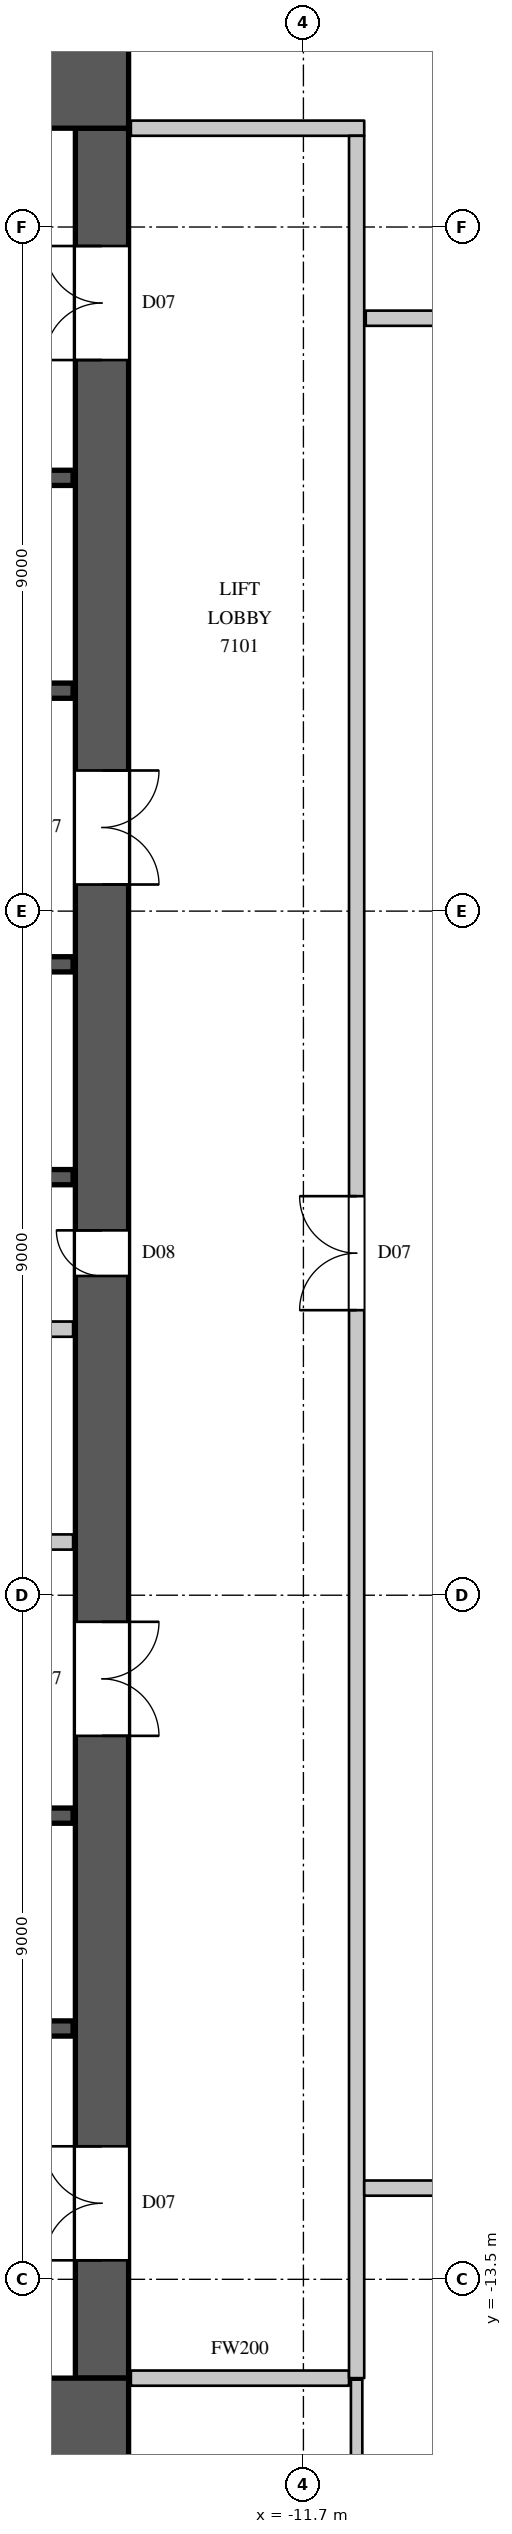
"""IFC4 building model, lengths in metres.
Left out: names, types, materials, properties, quantities, classifications, styles, units other than length and angle.
Written with IfcOpenShell. Run it as: python <this file> out.ifc"""

import sys

from ifc_helpers import new_model, si_unit, direction, frame, frame_2d, origin, place, context, subcontext, project, spatial, rectangle, extrude, element, fill, save


model = new_model("IFC4")
c1 = context("Model", 3, precision=1e-05, world=origin(), true_north=direction((0.0, 1.0)))
c2 = subcontext(c1, "Body", "Model", "MODEL_VIEW")
j1 = project(units=[si_unit("LENGTHUNIT", "METRE"), si_unit("PLANEANGLEUNIT", "RADIAN")], contexts=[c1])
p1 = place(None, origin())
s1 = spatial("IfcSite", under=j1, at=p1, CompositionType="ELEMENT")
p2 = place(p1, origin())
s2 = spatial("IfcBuilding", under=s1, at=p2, CompositionType="ELEMENT")
p3 = place(p2, frame((0.0, 0.0, 313.1)))
s3 = spatial("IfcBuildingStorey", under=s2, at=p3, CompositionType="ELEMENT", Elevation=313.1)
for number, where, z_axis, x_axis in (
    (1, (-30.0, 15.4, 0.0), (0.0, 0.0, 1.0), (1.0, 0.0, 0.0)),
    (2, (-30.0, -15.4, 0.0), (0.0, 0.0, 1.0), (1.0, 0.0, 0.0)),
):
    element("IfcWall", number, at=place(p3, frame(where, z_axis=z_axis, x_axis=x_axis)), inside=s3, PredefinedType="SHEAR", context=c2, shape_type="SweptSolid", body=[
        extrude(rectangle(XDim=16.0, YDim=1.2, at=frame_2d((8.0, 0.0))), origin(), (0.0, 0.0, 1.0), 4.1),
    ])
p4 = place(p3, frame((-14.35, -14.8, 0.0), z_axis=(0.0, 0.0, 1.0), x_axis=(0.0, 1.0, 0.0)))
e3 = element("IfcWall", 3, at=p4, inside=s3, PredefinedType="SHEAR", context=c2, shape_type="SweptSolid", body=[
    extrude(rectangle(XDim=29.6, YDim=0.7, at=frame_2d((14.8, 0.0))), origin(), (0.0, 0.0, 1.0), 4.1),
])
p5 = place(p4, frame((1.55, 0.0, 0.0)))
e4 = element("IfcOpeningElement", 4, at=p5, cuts=e3, PredefinedType="OPENING", context=c2, shape_type="SweptSolid", body=[
    extrude(rectangle(XDim=1.5, YDim=2.4, at=frame_2d((0.75, 1.2))), frame((0.0, 0.36, 0.0), z_axis=(0.0, -1.0, 0.0), x_axis=(1.0, 0.0, 0.0)), (0.0, 0.0, 1.0), 0.72),
])
p6 = place(p4, frame((26.55, 0.0, 0.0)))
e5 = element("IfcOpeningElement", 5, at=p6, cuts=e3, PredefinedType="OPENING", context=c2, shape_type="SweptSolid", body=[
    extrude(rectangle(XDim=1.5, YDim=2.4, at=frame_2d((0.75, 1.2))), frame((0.0, 0.36, 0.0), z_axis=(0.0, -1.0, 0.0), x_axis=(1.0, 0.0, 0.0)), (0.0, 0.0, 1.0), 0.72),
])
p7 = place(p4, frame((8.45, 0.0, 0.0)))
e6 = element("IfcOpeningElement", 6, at=p7, cuts=e3, PredefinedType="OPENING", context=c2, shape_type="SweptSolid", body=[
    extrude(rectangle(XDim=1.5, YDim=2.4, at=frame_2d((0.75, 1.2))), frame((0.0, 0.36, 0.0), z_axis=(0.0, -1.0, 0.0), x_axis=(1.0, 0.0, 0.0)), (0.0, 0.0, 1.0), 0.72),
])
p8 = place(p4, frame((19.65, 0.0, 0.0)))
e7 = element("IfcOpeningElement", 7, at=p8, cuts=e3, PredefinedType="OPENING", context=c2, shape_type="SweptSolid", body=[
    extrude(rectangle(XDim=1.5, YDim=2.4, at=frame_2d((0.75, 1.2))), frame((0.0, 0.36, 0.0), z_axis=(0.0, -1.0, 0.0), x_axis=(1.0, 0.0, 0.0)), (0.0, 0.0, 1.0), 0.72),
])
p9 = place(p4, frame((14.5, 0.0, 0.0)))
e8 = element("IfcOpeningElement", 8, at=p9, cuts=e3, PredefinedType="OPENING", context=c2, shape_type="SweptSolid", body=[
    extrude(rectangle(XDim=0.6, YDim=2.0, at=frame_2d((0.3, 1.0))), frame((0.0, 0.36, 0.0), z_axis=(0.0, -1.0, 0.0), x_axis=(1.0, 0.0, 0.0)), (0.0, 0.0, 1.0), 0.72),
])
p10 = place(p3, frame((-29.27, -3.8, 0.0), z_axis=(0.0, 0.0, 1.0), x_axis=(1.0, 0.0, 0.0)))
e9 = element("IfcWall", 9, at=p10, inside=s3, PredefinedType="PARTITIONING", context=c2, shape_type="SweptSolid", body=[
    extrude(rectangle(XDim=14.54, YDim=0.2, at=frame_2d((7.27, 0.0))), origin(), (0.0, 0.0, 1.0), 3.8),
])
p11 = place(p10, frame((6.8, 0.0, 0.0)))
e10 = element("IfcOpeningElement", 10, at=p11, cuts=e9, PredefinedType="OPENING", context=c2, shape_type="SweptSolid", body=[
    extrude(rectangle(XDim=0.9, YDim=2.2, at=frame_2d((0.45, 1.1))), frame((0.0, 0.11, 0.0), z_axis=(0.0, -1.0, 0.0), x_axis=(1.0, 0.0, 0.0)), (0.0, 0.0, 1.0), 0.22),
])
p12 = place(p3, frame((-13.97, -14.8, 0.0), z_axis=(0.0, 0.0, 1.0), x_axis=(1.0, 0.0, 0.0)))
e11 = element("IfcWall", 11, at=p12, inside=s3, PredefinedType="PARTITIONING", context=c2, shape_type="SweptSolid", body=[
    extrude(rectangle(XDim=2.87, YDim=0.2, at=frame_2d((1.435, 0.0))), origin(), (0.0, 0.0, 1.0), 3.8),
])
p13 = place(p3, frame((-13.97, 14.8, 0.0), z_axis=(0.0, 0.0, 1.0), x_axis=(1.0, 0.0, 0.0)))
e12 = element("IfcWall", 12, at=p13, inside=s3, PredefinedType="PARTITIONING", context=c2, shape_type="SweptSolid", body=[
    extrude(rectangle(XDim=3.07, YDim=0.2, at=frame_2d((1.535, 0.0))), origin(), (0.0, 0.0, 1.0), 3.8),
])
p14 = place(p3, frame((-11.0, -14.8, 0.0), z_axis=(0.0, 0.0, 1.0), x_axis=(0.0, 1.0, 0.0)))
e13 = element("IfcWall", 13, at=p14, inside=s3, PredefinedType="PARTITIONING", context=c2, shape_type="SweptSolid", body=[
    extrude(rectangle(XDim=29.5, YDim=0.2, at=frame_2d((14.75, 0.0))), origin(), (0.0, 0.0, 1.0), 3.8),
])
p15 = place(p14, frame((14.05, 0.0, 0.0)))
e14 = element("IfcOpeningElement", 14, at=p15, cuts=e13, PredefinedType="OPENING", context=c2, shape_type="SweptSolid", body=[
    extrude(rectangle(XDim=1.5, YDim=2.4, at=frame_2d((0.75, 1.2))), frame((0.0, 0.11, 0.0), z_axis=(0.0, -1.0, 0.0), x_axis=(1.0, 0.0, 0.0)), (0.0, 0.0, 1.0), 0.22),
])
p16 = place(p3, frame((-10.9, -12.3, 0.0), z_axis=(0.0, 0.0, 1.0), x_axis=(1.0, 0.0, 0.0)))
e15 = element("IfcWall", 15, at=p16, inside=s3, PredefinedType="PARTITIONING", context=c2, shape_type="SweptSolid", body=[
    extrude(rectangle(XDim=22.1, YDim=0.2, at=frame_2d((11.05, 0.0))), origin(), (0.0, 0.0, 1.0), 3.8),
])
p17 = place(p16, frame((0.95, 0.0, 0.0)))
e16 = element("IfcOpeningElement", 16, at=p17, cuts=e15, PredefinedType="OPENING", context=c2, shape_type="SweptSolid", body=[
    extrude(rectangle(XDim=0.9, YDim=2.2, at=frame_2d((0.45, 1.1))), frame((0.0, 0.11, 0.0), z_axis=(0.0, -1.0, 0.0), x_axis=(1.0, 0.0, 0.0)), (0.0, 0.0, 1.0), 0.22),
])
p18 = place(p16, frame((3.95, 0.0, 0.0)))
e17 = element("IfcOpeningElement", 17, at=p18, cuts=e15, PredefinedType="OPENING", context=c2, shape_type="SweptSolid", body=[
    extrude(rectangle(XDim=0.9, YDim=2.2, at=frame_2d((0.45, 1.1))), frame((0.0, 0.11, 0.0), z_axis=(0.0, -1.0, 0.0), x_axis=(1.0, 0.0, 0.0)), (0.0, 0.0, 1.0), 0.22),
])
p19 = place(p16, frame((7.1, 0.0, 0.0)))
e18 = element("IfcOpeningElement", 18, at=p19, cuts=e15, PredefinedType="OPENING", context=c2, shape_type="SweptSolid", body=[
    extrude(rectangle(XDim=0.9, YDim=2.2, at=frame_2d((0.45, 1.1))), frame((0.0, 0.11, 0.0), z_axis=(0.0, -1.0, 0.0), x_axis=(1.0, 0.0, 0.0)), (0.0, 0.0, 1.0), 0.22),
])
p20 = place(p16, frame((10.0, 0.0, 0.0)))
e19 = element("IfcOpeningElement", 19, at=p20, cuts=e15, PredefinedType="OPENING", context=c2, shape_type="SweptSolid", body=[
    extrude(rectangle(XDim=0.9, YDim=2.2, at=frame_2d((0.45, 1.1))), frame((0.0, 0.11, 0.0), z_axis=(0.0, -1.0, 0.0), x_axis=(1.0, 0.0, 0.0)), (0.0, 0.0, 1.0), 0.22),
])
p21 = place(p16, frame((13.25, 0.0, 0.0)))
e20 = element("IfcOpeningElement", 20, at=p21, cuts=e15, PredefinedType="OPENING", context=c2, shape_type="SweptSolid", body=[
    extrude(rectangle(XDim=0.9, YDim=2.2, at=frame_2d((0.45, 1.1))), frame((0.0, 0.11, 0.0), z_axis=(0.0, -1.0, 0.0), x_axis=(1.0, 0.0, 0.0)), (0.0, 0.0, 1.0), 0.22),
])
p22 = place(p16, frame((16.85, 0.0, 0.0)))
e21 = element("IfcOpeningElement", 21, at=p22, cuts=e15, PredefinedType="OPENING", context=c2, shape_type="SweptSolid", body=[
    extrude(rectangle(XDim=1.1, YDim=2.4, at=frame_2d((0.55, 1.2))), frame((0.0, 0.11, 0.0), z_axis=(0.0, -1.0, 0.0), x_axis=(1.0, 0.0, 0.0)), (0.0, 0.0, 1.0), 0.22),
])
p23 = place(p3, frame((-10.88, 12.3, 0.0), z_axis=(0.0, 0.0, 1.0), x_axis=(1.0, 0.0, 0.0)))
e22 = element("IfcWall", 22, at=p23, inside=s3, PredefinedType="PARTITIONING", context=c2, shape_type="SweptSolid", body=[
    extrude(rectangle(XDim=3.818, YDim=0.2, at=frame_2d((1.909, 0.0))), origin(), (0.0, 0.0, 1.0), 3.8),
])
p24 = place(p23, frame((2.4, 0.0, 0.0)))
e23 = element("IfcOpeningElement", 23, at=p24, cuts=e22, PredefinedType="OPENING", context=c2, shape_type="SweptSolid", body=[
    extrude(rectangle(XDim=1.1, YDim=2.4, at=frame_2d((0.55, 1.2))), frame((0.0, 0.11, 0.0), z_axis=(0.0, -1.0, 0.0), x_axis=(1.0, 0.0, 0.0)), (0.0, 0.0, 1.0), 0.22),
])
p25 = place(p3, frame((-11.0, -23.757, 0.0), z_axis=(0.0, 0.0, 1.0), x_axis=(0.0, 1.0, 0.0)))
e24 = element("IfcWall", 24, at=p25, inside=s3, PredefinedType="PARTITIONING", context=c2, shape_type="SweptSolid", body=[
    extrude(rectangle(XDim=8.937, YDim=0.15, at=frame_2d((4.468, 0.0))), origin(), (0.0, 0.0, 1.0), 3.8),
])
p26 = place(p3, frame((-29.27, -1.0, 0.0), z_axis=(0.0, 0.0, 1.0), x_axis=(1.0, 0.0, 0.0)))
e25 = element("IfcWall", 25, at=p26, inside=s3, PredefinedType="PARTITIONING", context=c2, shape_type="SweptSolid", body=[
    extrude(rectangle(XDim=14.54, YDim=0.2, at=frame_2d((7.27, 0.0))), origin(), (0.0, 0.0, 1.0), 3.8),
])
p27 = place(p3, frame((-17.92, -10.2, 0.0), z_axis=(0.0, 0.0, 1.0), x_axis=(1.0, 0.0, 0.0)))
e26 = element("IfcWall", 26, at=p27, inside=s3, PredefinedType="SHEAR", context=c2, shape_type="SweptSolid", body=[
    extrude(rectangle(XDim=3.19, YDim=0.2, at=frame_2d((1.595, 0.0))), origin(), (0.0, 0.0, 1.0), 3.8),
])
p28 = place(p27, frame((1.05, 0.0, 0.0)))
e27 = element("IfcOpeningElement", 27, at=p28, cuts=e26, PredefinedType="OPENING", context=c2, shape_type="SweptSolid", body=[
    extrude(rectangle(XDim=1.1, YDim=2.2, at=frame_2d((0.55, 1.1))), frame((0.0, 0.11, 0.0), z_axis=(0.0, -1.0, 0.0), x_axis=(1.0, 0.0, 0.0)), (0.0, 0.0, 1.0), 0.22),
])
for number, where, z_axis, x_axis in (
    (28, (-17.9, -7.4, 0.0), (0.0, 0.0, 1.0), (1.0, 0.0, 0.0)),
    (29, (-17.9, 1.0, 0.0), (0.0, 0.0, 1.0), (1.0, 0.0, 0.0)),
):
    element("IfcWall", number, at=place(p3, frame(where, z_axis=z_axis, x_axis=x_axis)), inside=s3, PredefinedType="SHEAR", context=c2, shape_type="SweptSolid", body=[
        extrude(rectangle(XDim=3.17, YDim=0.2, at=frame_2d((1.585, 0.0))), origin(), (0.0, 0.0, 1.0), 3.8),
    ])
p29 = place(p3, frame((-17.9, 3.8, 0.0), z_axis=(0.0, 0.0, 1.0), x_axis=(1.0, 0.0, 0.0)))
e30 = element("IfcWall", 30, at=p29, inside=s3, PredefinedType="SHEAR", context=c2, shape_type="SweptSolid", body=[
    extrude(rectangle(XDim=3.17, YDim=0.2, at=frame_2d((1.585, 0.0))), origin(), (0.0, 0.0, 1.0), 3.8),
])
p30 = place(p29, frame((1.05, 0.0, 0.0)))
e31 = element("IfcOpeningElement", 31, at=p30, cuts=e30, PredefinedType="OPENING", context=c2, shape_type="SweptSolid", body=[
    extrude(rectangle(XDim=1.1, YDim=2.2, at=frame_2d((0.55, 1.1))), frame((0.0, 0.11, 0.0), z_axis=(0.0, -1.0, 0.0), x_axis=(1.0, 0.0, 0.0)), (0.0, 0.0, 1.0), 0.22),
])
p31 = place(p3, frame((-17.92, 7.4, 0.0), z_axis=(0.0, 0.0, 1.0), x_axis=(1.0, 0.0, 0.0)))
e32 = element("IfcWall", 32, at=p31, inside=s3, PredefinedType="SHEAR", context=c2, shape_type="SweptSolid", body=[
    extrude(rectangle(XDim=3.19, YDim=0.2, at=frame_2d((1.595, 0.0))), origin(), (0.0, 0.0, 1.0), 3.8),
])
p32 = place(p3, frame((-17.92, 10.2, 0.0), z_axis=(0.0, 0.0, 1.0), x_axis=(1.0, 0.0, 0.0)))
e33 = element("IfcWall", 33, at=p32, inside=s3, PredefinedType="SHEAR", context=c2, shape_type="SweptSolid", body=[
    extrude(rectangle(XDim=3.19, YDim=0.2, at=frame_2d((1.595, 0.0))), origin(), (0.0, 0.0, 1.0), 3.8),
])
p33 = place(p32, frame((1.05, 0.0, 0.0)))
e34 = element("IfcOpeningElement", 34, at=p33, cuts=e33, PredefinedType="OPENING", context=c2, shape_type="SweptSolid", body=[
    extrude(rectangle(XDim=1.1, YDim=2.2, at=frame_2d((0.55, 1.1))), frame((0.0, 0.11, 0.0), z_axis=(0.0, -1.0, 0.0), x_axis=(1.0, 0.0, 0.0)), (0.0, 0.0, 1.0), 0.22),
])
p34 = place(p15, origin())
e35 = element("IfcDoor", 35, at=p34, inside=s3, OperationType="DOUBLE_DOOR_SINGLE_SWING", PredefinedType="DOOR", context=c2, shape_type="SweptSolid", body=[
    extrude(rectangle(XDim=1.5, YDim=2.4, at=frame_2d((0.75, 1.2))), frame((0.0, 0.025, 0.0), z_axis=(0.0, -1.0, 0.0), x_axis=(1.0, 0.0, 0.0)), (0.0, 0.0, 1.0), 0.05),
])
fill(e14, e35)
p35 = place(p5, origin())
e36 = element("IfcDoor", 36, at=p35, inside=s3, OperationType="DOUBLE_DOOR_SINGLE_SWING", PredefinedType="DOOR", context=c2, shape_type="SweptSolid", body=[
    extrude(rectangle(XDim=1.5, YDim=2.4, at=frame_2d((0.75, 1.2))), frame((0.0, 0.345, 0.0), z_axis=(0.0, -1.0, 0.0), x_axis=(1.0, 0.0, 0.0)), (0.0, 0.0, 1.0), 0.05),
])
fill(e4, e36)
p36 = place(p6, origin())
e37 = element("IfcDoor", 37, at=p36, inside=s3, OperationType="DOUBLE_DOOR_SINGLE_SWING", PredefinedType="DOOR", context=c2, shape_type="SweptSolid", body=[
    extrude(rectangle(XDim=1.5, YDim=2.4, at=frame_2d((0.75, 1.2))), frame((0.0, 0.345, 0.0), z_axis=(0.0, -1.0, 0.0), x_axis=(1.0, 0.0, 0.0)), (0.0, 0.0, 1.0), 0.05),
])
fill(e5, e37)
p37 = place(p7, origin())
e38 = element("IfcDoor", 38, at=p37, inside=s3, OperationType="DOUBLE_DOOR_SINGLE_SWING", PredefinedType="DOOR", context=c2, shape_type="SweptSolid", body=[
    extrude(rectangle(XDim=1.5, YDim=2.4, at=frame_2d((0.75, 1.2))), frame((0.0, -0.295, 0.0), z_axis=(0.0, -1.0, 0.0), x_axis=(1.0, 0.0, 0.0)), (0.0, 0.0, 1.0), 0.05),
])
fill(e6, e38)
p38 = place(p8, origin())
e39 = element("IfcDoor", 39, at=p38, inside=s3, OperationType="DOUBLE_DOOR_SINGLE_SWING", PredefinedType="DOOR", context=c2, shape_type="SweptSolid", body=[
    extrude(rectangle(XDim=1.5, YDim=2.4, at=frame_2d((0.75, 1.2))), frame((0.0, -0.295, 0.0), z_axis=(0.0, -1.0, 0.0), x_axis=(1.0, 0.0, 0.0)), (0.0, 0.0, 1.0), 0.05),
])
fill(e7, e39)
p39 = place(p9, origin())
e40 = element("IfcDoor", 40, at=p39, inside=s3, OperationType="SINGLE_SWING_RIGHT", PredefinedType="DOOR", context=c2, shape_type="SweptSolid", body=[
    extrude(rectangle(XDim=0.6, YDim=2.0, at=frame_2d((0.3, 1.0))), frame((0.0, 0.345, 0.0), z_axis=(0.0, -1.0, 0.0), x_axis=(1.0, 0.0, 0.0)), (0.0, 0.0, 1.0), 0.05),
])
fill(e8, e40)
save(model, sys.argv[1])
